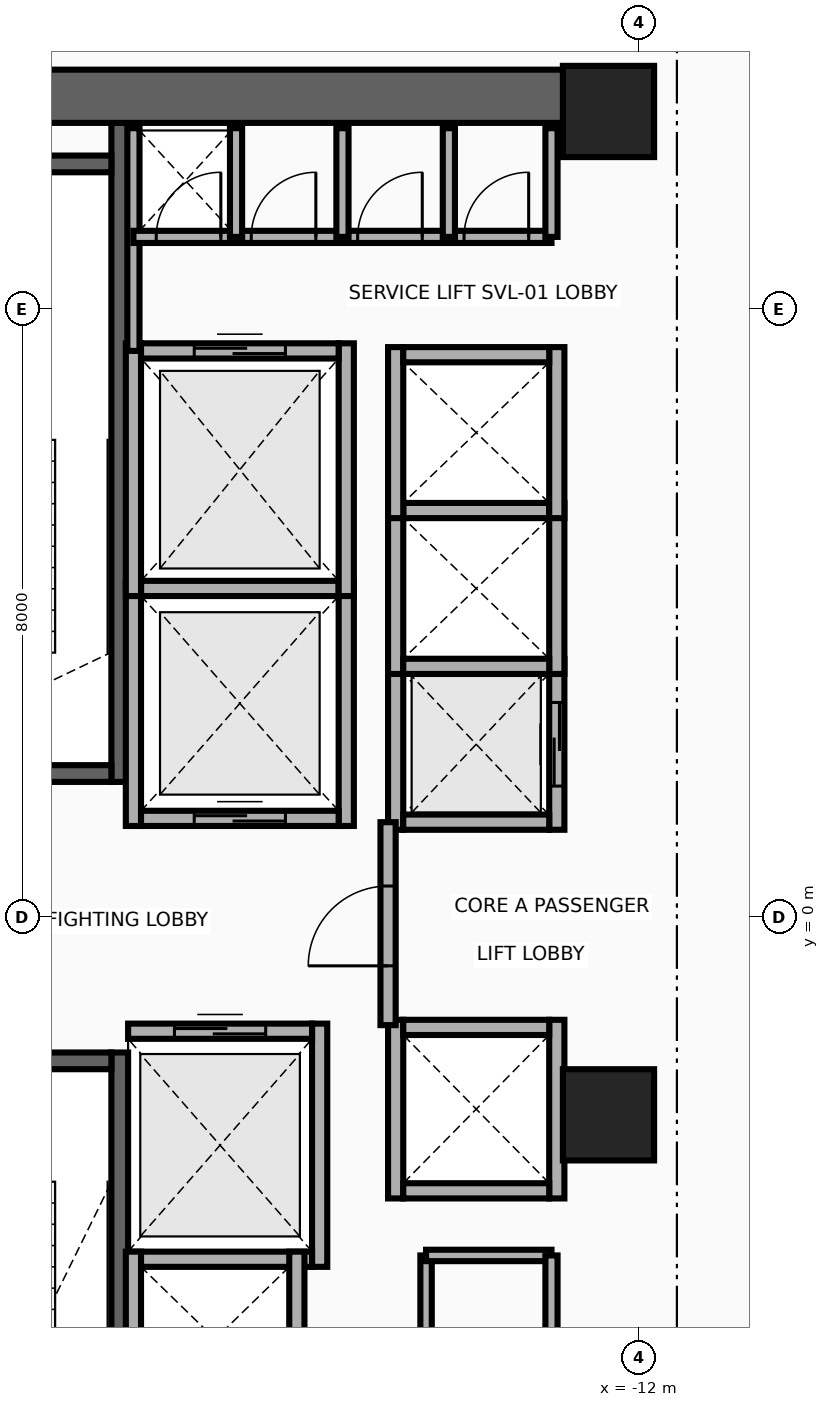
"""IFC4 building model, lengths in metres.
Left out: names, types, materials, properties, quantities, classifications, styles, units other than length and angle.
Written with IfcOpenShell. Run it as: python <this file> out.ifc"""

import sys

from ifc_helpers import new_model, si_unit, direction, frame, frame_2d, origin, origin_2d, place, context, subcontext, project, spatial, rectangle, extrude, source, transform, mapped, element, fill, save


model = new_model("IFC4")
c1 = context("Model", 3, precision=1e-05, world=origin(), true_north=direction((0.0, 1.0)))
c2 = subcontext(c1, "Body", "Model", "MODEL_VIEW")
j1 = project(units=[si_unit("LENGTHUNIT", "METRE"), si_unit("PLANEANGLEUNIT", "RADIAN")], contexts=[c1])
p1 = place(None, origin())
s1 = spatial("IfcSite", under=j1, at=p1, CompositionType="ELEMENT")
p2 = place(p1, origin())
s2 = spatial("IfcBuilding", under=s1, at=p2, CompositionType="ELEMENT")
p3 = place(p2, frame((0.0, 0.0, 139.0)))
s3 = spatial("IfcBuildingStorey", under=s2, at=p3, CompositionType="ELEMENT", Elevation=139.0)
p4 = place(p3, frame((-18.83, 1.78, 0.0), z_axis=(0.0, 0.0, 1.0), x_axis=(0.0, 1.0, 0.0)))
e1 = element("IfcWall", 1, at=p4, inside=s3, PredefinedType="SHEAR", context=c2, shape_type="SweptSolid", body=[
    extrude(rectangle(XDim=8.67, YDim=0.22, at=frame_2d((4.335, 0.0))), origin(), (0.0, 0.0, 1.0), 3.46),
])
p5 = place(p3, frame((-22.05, 1.89, 0.0), z_axis=(0.0, 0.0, 1.0), x_axis=(1.0, 0.0, 0.0)))
e2 = element("IfcWall", 2, at=p5, inside=s3, PredefinedType="SHEAR", context=c2, shape_type="SweptSolid", body=[
    extrude(rectangle(XDim=3.11, YDim=0.22, at=frame_2d((1.555, 0.0))), origin(), (0.0, 0.0, 1.0), 3.46),
])
p6 = place(p5, frame((1.0, 0.0, 0.0)))
e3 = element("IfcOpeningElement", 3, at=p6, cuts=e2, PredefinedType="OPENING", context=c2, shape_type="SweptSolid", body=[
    extrude(rectangle(XDim=1.1, YDim=2.15, at=frame_2d((0.55, 1.075))), frame((0.0, 0.125, 0.0), z_axis=(0.0, -1.0, 0.0), x_axis=(1.0, 0.0, 0.0)), (0.0, 0.0, 1.0), 0.25),
])
p7 = place(p3, frame((-22.05, 9.91, 0.0), z_axis=(0.0, 0.0, 1.0), x_axis=(1.0, 0.0, 0.0)))
e4 = element("IfcWall", 4, at=p7, inside=s3, PredefinedType="SHEAR", context=c2, shape_type="SweptSolid", body=[
    extrude(rectangle(XDim=3.11, YDim=0.22, at=frame_2d((1.555, 0.0))), origin(), (0.0, 0.0, 1.0), 3.46),
])
p8 = place(p3, frame((-18.83, -10.45, 0.0), z_axis=(0.0, 0.0, 1.0), x_axis=(0.0, 1.0, 0.0)))
e5 = element("IfcWall", 5, at=p8, inside=s3, PredefinedType="SHEAR", context=c2, shape_type="SweptSolid", body=[
    extrude(rectangle(XDim=8.67, YDim=0.22, at=frame_2d((4.335, 0.0))), origin(), (0.0, 0.0, 1.0), 3.46),
])
p9 = place(p3, frame((-22.05, -1.89, 0.0), z_axis=(0.0, 0.0, 1.0), x_axis=(1.0, 0.0, 0.0)))
e6 = element("IfcWall", 6, at=p9, inside=s3, PredefinedType="SHEAR", context=c2, shape_type="SweptSolid", body=[
    extrude(rectangle(XDim=3.11, YDim=0.22, at=frame_2d((1.555, 0.0))), origin(), (0.0, 0.0, 1.0), 3.46),
])
p10 = place(p9, frame((1.0, 0.0, 0.0)))
e7 = element("IfcOpeningElement", 7, at=p10, cuts=e6, PredefinedType="OPENING", context=c2, shape_type="SweptSolid", body=[
    extrude(rectangle(XDim=1.1, YDim=2.15, at=frame_2d((0.55, 1.075))), frame((0.0, 0.125, 0.0), z_axis=(0.0, -1.0, 0.0), x_axis=(1.0, 0.0, 0.0)), (0.0, 0.0, 1.0), 0.25),
])
p11 = place(p3, frame((-22.65, 10.8, 0.0), z_axis=(0.0, 0.0, 1.0), x_axis=(1.0, 0.0, 0.0)))
e8 = element("IfcWall", 8, at=p11, inside=s3, PredefinedType="SHEAR", context=c2, shape_type="SweptSolid", body=[
    extrude(rectangle(XDim=10.25, YDim=0.7, at=frame_2d((5.125, 0.0))), origin(), (0.0, 0.0, 1.0), 3.46),
])
m1 = source(origin(), c2, "Body", "SweptSolid", [
    extrude(rectangle(XDim=1.2, YDim=1.2, at=origin_2d()), origin(), (0.0, 0.0, 1.0), 3.7),
])
for number, where, z_axis, x_axis in (
    (9, (-12.4, -2.6, 0.0), (0.0, 0.0, 1.0), (1.0, 0.0, 0.0)),
    (10, (-12.4, 10.6, 0.0), (0.0, 0.0, 1.0), (1.0, 0.0, 0.0)),
):
    element("IfcColumn", number, at=place(p3, frame(where, z_axis=z_axis, x_axis=x_axis)), inside=s3, PredefinedType="COLUMN", context=c2, shape_type="MappedRepresentation", body=[
        mapped(m1, transform((0.0, 0.0, 0.0), x_axis=(1.0, 0.0, 0.0), y_axis=(0.0, 1.0, 0.0), z_axis=(0.0, 0.0, 1.0), scale=1.0)),
    ])
for number, where, z_axis, x_axis in (
    (11, (-18.65, 1.2, 0.0), (0.0, 0.0, 1.0), (0.0, 1.0, 0.0)),
    (12, (-15.85, 1.2, 0.0), (0.0, 0.0, 1.0), (0.0, 1.0, 0.0)),
):
    element("IfcWall", number, at=place(p3, frame(where, z_axis=z_axis, x_axis=x_axis)), inside=s3, PredefinedType="MOVABLE", context=c2, shape_type="SweptSolid", body=[
        extrude(rectangle(XDim=3.225, YDim=0.2, at=frame_2d((1.613, 0.0))), origin(), (0.0, 0.0, 1.0), 3.46),
    ])
p12 = place(p3, frame((-18.55, 1.3, 0.0), z_axis=(0.0, 0.0, 1.0), x_axis=(1.0, 0.0, 0.0)))
e13 = element("IfcWall", 13, at=p12, inside=s3, PredefinedType="MOVABLE", context=c2, shape_type="SweptSolid", body=[
    extrude(rectangle(XDim=2.6, YDim=0.2, at=frame_2d((1.3, 0.0))), origin(), (0.0, 0.0, 1.0), 3.46),
])
p13 = place(p12, frame((0.7, 0.0, 0.0)))
e14 = element("IfcOpeningElement", 14, at=p13, cuts=e13, PredefinedType="OPENING", context=c2, shape_type="SweptSolid", body=[
    extrude(rectangle(XDim=1.2, YDim=2.1, at=frame_2d((0.6, 1.05))), frame((0.0, 0.115, 0.0), z_axis=(0.0, -1.0, 0.0), x_axis=(1.0, 0.0, 0.0)), (0.0, 0.0, 1.0), 0.23),
])
p14 = place(p3, frame((-18.55, 4.325, 0.0), z_axis=(0.0, 0.0, 1.0), x_axis=(1.0, 0.0, 0.0)))
e15 = element("IfcWall", 15, at=p14, inside=s3, PredefinedType="MOVABLE", context=c2, shape_type="SweptSolid", body=[
    extrude(rectangle(XDim=2.6, YDim=0.2, at=frame_2d((1.3, 0.0))), origin(), (0.0, 0.0, 1.0), 3.46),
])
p15 = place(p3, frame((-16.2, -4.6, 0.0), z_axis=(0.0, 0.0, 1.0), x_axis=(0.0, 1.0, 0.0)))
e16 = element("IfcWall", 16, at=p15, inside=s3, PredefinedType="MOVABLE", context=c2, shape_type="SweptSolid", body=[
    extrude(rectangle(XDim=3.2, YDim=0.2, at=frame_2d((1.6, 0.0))), origin(), (0.0, 0.0, 1.0), 3.46),
])
p16 = place(p3, frame((-18.72, -4.5, 0.0), z_axis=(0.0, 0.0, 1.0), x_axis=(1.0, 0.0, 0.0)))
e17 = element("IfcWall", 17, at=p16, inside=s3, PredefinedType="MOVABLE", context=c2, shape_type="SweptSolid", body=[
    extrude(rectangle(XDim=2.42, YDim=0.2, at=frame_2d((1.21, 0.0))), origin(), (0.0, 0.0, 1.0), 3.46),
])
p17 = place(p3, frame((-18.72, -1.5, 0.0), z_axis=(0.0, 0.0, 1.0), x_axis=(1.0, 0.0, 0.0)))
e18 = element("IfcWall", 18, at=p17, inside=s3, PredefinedType="MOVABLE", context=c2, shape_type="SweptSolid", body=[
    extrude(rectangle(XDim=2.42, YDim=0.2, at=frame_2d((1.21, 0.0))), origin(), (0.0, 0.0, 1.0), 3.46),
])
p18 = place(p17, frame((0.61, 0.0, 0.0)))
e19 = element("IfcOpeningElement", 19, at=p18, cuts=e18, PredefinedType="OPENING", context=c2, shape_type="SweptSolid", body=[
    extrude(rectangle(XDim=1.2, YDim=2.1, at=frame_2d((0.6, 1.05))), frame((0.0, 0.115, 0.0), z_axis=(0.0, -1.0, 0.0), x_axis=(1.0, 0.0, 0.0)), (0.0, 0.0, 1.0), 0.23),
])
for number, where, z_axis, x_axis in (
    (20, (-18.65, 4.225, 0.0), (0.0, 0.0, 1.0), (0.0, 1.0, 0.0)),
    (21, (-15.85, 4.225, 0.0), (0.0, 0.0, 1.0), (0.0, 1.0, 0.0)),
):
    element("IfcWall", number, at=place(p3, frame(where, z_axis=z_axis, x_axis=x_axis)), inside=s3, PredefinedType="MOVABLE", context=c2, shape_type="SweptSolid", body=[
        extrude(rectangle(XDim=3.325, YDim=0.2, at=frame_2d((1.663, 0.0))), origin(), (0.0, 0.0, 1.0), 3.46),
    ])
p19 = place(p3, frame((-18.55, 7.45, 0.0), z_axis=(0.0, 0.0, 1.0), x_axis=(1.0, 0.0, 0.0)))
e22 = element("IfcWall", 22, at=p19, inside=s3, PredefinedType="MOVABLE", context=c2, shape_type="SweptSolid", body=[
    extrude(rectangle(XDim=2.6, YDim=0.2, at=frame_2d((1.3, 0.0))), origin(), (0.0, 0.0, 1.0), 3.46),
])
p20 = place(p19, frame((0.7, 0.0, 0.0)))
e23 = element("IfcOpeningElement", 23, at=p20, cuts=e22, PredefinedType="OPENING", context=c2, shape_type="SweptSolid", body=[
    extrude(rectangle(XDim=1.2, YDim=2.1, at=frame_2d((0.6, 1.05))), frame((0.0, 0.115, 0.0), z_axis=(0.0, -1.0, 0.0), x_axis=(1.0, 0.0, 0.0)), (0.0, 0.0, 1.0), 0.23),
])
p21 = place(p3, frame((-15.2, 1.15, 0.0), z_axis=(0.0, 0.0, 1.0), x_axis=(0.0, 1.0, 0.0)))
e24 = element("IfcWall", 24, at=p21, inside=s3, PredefinedType="MOVABLE", context=c2, shape_type="SweptSolid", body=[
    extrude(rectangle(XDim=2.25, YDim=0.2, at=frame_2d((1.125, 0.0))), origin(), (0.0, 0.0, 1.0), 3.46),
])
p22 = place(p3, frame((-13.08, 1.15, 0.0), z_axis=(0.0, 0.0, 1.0), x_axis=(0.0, 1.0, 0.0)))
e25 = element("IfcWall", 25, at=p22, inside=s3, PredefinedType="MOVABLE", context=c2, shape_type="SweptSolid", body=[
    extrude(rectangle(XDim=2.25, YDim=0.2, at=frame_2d((1.125, 0.0))), origin(), (0.0, 0.0, 1.0), 3.46),
])
p23 = place(p22, frame((0.575, 0.0, 0.0)))
e26 = element("IfcOpeningElement", 26, at=p23, cuts=e25, PredefinedType="OPENING", context=c2, shape_type="SweptSolid", body=[
    extrude(rectangle(XDim=1.1, YDim=2.1, at=frame_2d((0.55, 1.05))), frame((0.0, 0.115, 0.0), z_axis=(0.0, -1.0, 0.0), x_axis=(1.0, 0.0, 0.0)), (0.0, 0.0, 1.0), 0.23),
])
p24 = place(p3, frame((-15.1, 1.25, 0.0), z_axis=(0.0, 0.0, 1.0), x_axis=(1.0, 0.0, 0.0)))
e27 = element("IfcWall", 27, at=p24, inside=s3, PredefinedType="MOVABLE", context=c2, shape_type="SweptSolid", body=[
    extrude(rectangle(XDim=1.92, YDim=0.2, at=frame_2d((0.96, 0.0))), origin(), (0.0, 0.0, 1.0), 3.46),
])
for number, where, z_axis, x_axis in (
    (28, (-15.2, 3.2, 0.0), (0.0, 0.0, 1.0), (0.0, 1.0, 0.0)),
    (29, (-13.08, 3.2, 0.0), (0.0, 0.0, 1.0), (0.0, 1.0, 0.0)),
):
    element("IfcWall", number, at=place(p3, frame(where, z_axis=z_axis, x_axis=x_axis)), inside=s3, PredefinedType="MOVABLE", context=c2, shape_type="SweptSolid", body=[
        extrude(rectangle(XDim=2.25, YDim=0.2, at=frame_2d((1.125, 0.0))), origin(), (0.0, 0.0, 1.0), 3.46),
    ])
for number, where, z_axis, x_axis in (
    (30, (-15.1, 3.3, 0.0), (0.0, 0.0, 1.0), (1.0, 0.0, 0.0)),
    (31, (-15.1, 5.35, 0.0), (0.0, 0.0, 1.0), (1.0, 0.0, 0.0)),
):
    element("IfcWall", number, at=place(p3, frame(where, z_axis=z_axis, x_axis=x_axis)), inside=s3, PredefinedType="MOVABLE", context=c2, shape_type="SweptSolid", body=[
        extrude(rectangle(XDim=1.92, YDim=0.2, at=frame_2d((0.96, 0.0))), origin(), (0.0, 0.0, 1.0), 3.46),
    ])
for number, where, z_axis, x_axis in (
    (32, (-15.2, 5.25, 0.0), (0.0, 0.0, 1.0), (0.0, 1.0, 0.0)),
    (33, (-13.08, 5.25, 0.0), (0.0, 0.0, 1.0), (0.0, 1.0, 0.0)),
):
    element("IfcWall", number, at=place(p3, frame(where, z_axis=z_axis, x_axis=x_axis)), inside=s3, PredefinedType="MOVABLE", context=c2, shape_type="SweptSolid", body=[
        extrude(rectangle(XDim=2.25, YDim=0.2, at=frame_2d((1.125, 0.0))), origin(), (0.0, 0.0, 1.0), 3.46),
    ])
p25 = place(p3, frame((-15.1, 7.4, 0.0), z_axis=(0.0, 0.0, 1.0), x_axis=(1.0, 0.0, 0.0)))
e34 = element("IfcWall", 34, at=p25, inside=s3, PredefinedType="MOVABLE", context=c2, shape_type="SweptSolid", body=[
    extrude(rectangle(XDim=1.92, YDim=0.2, at=frame_2d((0.96, 0.0))), origin(), (0.0, 0.0, 1.0), 3.46),
])
for number, where, z_axis, x_axis in (
    (35, (-18.65, -6.7, 0.0), (0.0, 0.0, 1.0), (0.0, 1.0, 0.0)),
    (36, (-16.5, -6.7, 0.0), (0.0, 0.0, 1.0), (0.0, 1.0, 0.0)),
):
    element("IfcWall", number, at=place(p3, frame(where, z_axis=z_axis, x_axis=x_axis)), inside=s3, PredefinedType="MOVABLE", context=c2, shape_type="SweptSolid", body=[
        extrude(rectangle(XDim=2.3, YDim=0.2, at=frame_2d((1.15, 0.0))), origin(), (0.0, 0.0, 1.0), 3.46),
    ])
for number, where, z_axis, x_axis in (
    (37, (-15.2, -3.7, 0.0), (0.0, 0.0, 1.0), (0.0, 1.0, 0.0)),
    (38, (-13.08, -3.7, 0.0), (0.0, 0.0, 1.0), (0.0, 1.0, 0.0)),
):
    element("IfcWall", number, at=place(p3, frame(where, z_axis=z_axis, x_axis=x_axis)), inside=s3, PredefinedType="MOVABLE", context=c2, shape_type="SweptSolid", body=[
        extrude(rectangle(XDim=2.35, YDim=0.2, at=frame_2d((1.175, 0.0))), origin(), (0.0, 0.0, 1.0), 3.46),
    ])
for number, where, z_axis, x_axis in (
    (39, (-15.1, -3.6, 0.0), (0.0, 0.0, 1.0), (1.0, 0.0, 0.0)),
    (40, (-15.1, -1.45, 0.0), (0.0, 0.0, 1.0), (1.0, 0.0, 0.0)),
):
    element("IfcWall", number, at=place(p3, frame(where, z_axis=z_axis, x_axis=x_axis)), inside=s3, PredefinedType="MOVABLE", context=c2, shape_type="SweptSolid", body=[
        extrude(rectangle(XDim=1.92, YDim=0.2, at=frame_2d((0.96, 0.0))), origin(), (0.0, 0.0, 1.0), 3.46),
    ])
p26 = place(p3, frame((-15.3, -1.42, 0.0), z_axis=(0.0, 0.0, 1.0), x_axis=(0.0, 1.0, 0.0)))
e41 = element("IfcWall", 41, at=p26, inside=s3, PredefinedType="PARTITIONING", context=c2, shape_type="SweptSolid", body=[
    extrude(rectangle(XDim=2.67, YDim=0.2, at=frame_2d((1.335, 0.0))), origin(), (0.0, 0.0, 1.0), 3.46),
])
p27 = place(p26, frame((0.78, 0.0, 0.0)))
e42 = element("IfcOpeningElement", 42, at=p27, cuts=e41, PredefinedType="OPENING", context=c2, shape_type="SweptSolid", body=[
    extrude(rectangle(XDim=1.05, YDim=2.15, at=frame_2d((0.525, 1.075))), frame((0.0, 0.115, 0.0), z_axis=(0.0, -1.0, 0.0), x_axis=(1.0, 0.0, 0.0)), (0.0, 0.0, 1.0), 0.23),
])
p28 = place(p3, frame((-18.65, 7.45, 0.0), z_axis=(0.0, 0.0, 1.0), x_axis=(0.0, 1.0, 0.0)))
e43 = element("IfcWall", 43, at=p28, inside=s3, PredefinedType="PARTITIONING", context=c2, shape_type="SweptSolid", body=[
    extrude(rectangle(XDim=2.93, YDim=0.16, at=frame_2d((1.465, 0.0))), origin(), (0.0, 0.0, 1.0), 3.46),
])
p29 = place(p3, frame((-18.65, 8.95, 0.0), z_axis=(0.0, 0.0, 1.0), x_axis=(1.0, 0.0, 0.0)))
e44 = element("IfcWall", 44, at=p29, inside=s3, PredefinedType="PARTITIONING", context=c2, shape_type="SweptSolid", body=[
    extrude(rectangle(XDim=5.5, YDim=0.16, at=frame_2d((2.75, 0.0))), origin(), (0.0, 0.0, 1.0), 3.46),
])
p30 = place(p29, frame((0.3, 0.0, 0.0)))
e45 = element("IfcOpeningElement", 45, at=p30, cuts=e44, PredefinedType="OPENING", context=c2, shape_type="SweptSolid", body=[
    extrude(rectangle(XDim=0.85, YDim=2.05, at=frame_2d((0.425, 1.025))), frame((0.0, 0.095, 0.0), z_axis=(0.0, -1.0, 0.0), x_axis=(1.0, 0.0, 0.0)), (0.0, 0.0, 1.0), 0.19),
])
p31 = place(p29, frame((1.55, 0.0, 0.0)))
e46 = element("IfcOpeningElement", 46, at=p31, cuts=e44, PredefinedType="OPENING", context=c2, shape_type="SweptSolid", body=[
    extrude(rectangle(XDim=0.85, YDim=2.05, at=frame_2d((0.425, 1.025))), frame((0.0, 0.095, 0.0), z_axis=(0.0, -1.0, 0.0), x_axis=(1.0, 0.0, 0.0)), (0.0, 0.0, 1.0), 0.19),
])
p32 = place(p29, frame((2.95, 0.0, 0.0)))
e47 = element("IfcOpeningElement", 47, at=p32, cuts=e44, PredefinedType="OPENING", context=c2, shape_type="SweptSolid", body=[
    extrude(rectangle(XDim=0.85, YDim=2.05, at=frame_2d((0.425, 1.025))), frame((0.0, 0.095, 0.0), z_axis=(0.0, -1.0, 0.0), x_axis=(1.0, 0.0, 0.0)), (0.0, 0.0, 1.0), 0.19),
])
p33 = place(p29, frame((4.35, 0.0, 0.0)))
e48 = element("IfcOpeningElement", 48, at=p33, cuts=e44, PredefinedType="OPENING", context=c2, shape_type="SweptSolid", body=[
    extrude(rectangle(XDim=0.85, YDim=2.05, at=frame_2d((0.425, 1.025))), frame((0.0, 0.095, 0.0), z_axis=(0.0, -1.0, 0.0), x_axis=(1.0, 0.0, 0.0)), (0.0, 0.0, 1.0), 0.19),
])
for number, where, z_axis, x_axis in (
    (49, (-13.15, 8.95, 0.0), (0.0, 0.0, 1.0), (0.0, 1.0, 0.0)),
    (50, (-17.3, 8.95, 0.0), (0.0, 0.0, 1.0), (0.0, 1.0, 0.0)),
    (51, (-15.9, 8.95, 0.0), (0.0, 0.0, 1.0), (0.0, 1.0, 0.0)),
    (52, (-14.5, 8.95, 0.0), (0.0, 0.0, 1.0), (0.0, 1.0, 0.0)),
):
    element("IfcWall", number, at=place(p3, frame(where, z_axis=z_axis, x_axis=x_axis)), inside=s3, PredefinedType="PARTITIONING", context=c2, shape_type="SweptSolid", body=[
        extrude(rectangle(XDim=1.43, YDim=0.16, at=frame_2d((0.715, 0.0))), origin(), (0.0, 0.0, 1.0), 3.46),
    ])
p34 = place(p3, frame((-14.8, -6.58, 0.0), z_axis=(0.0, 0.0, 1.0), x_axis=(0.0, 1.0, 0.0)))
e53 = element("IfcWall", 53, at=p34, inside=s3, PredefinedType="PARTITIONING", context=c2, shape_type="SweptSolid", body=[
    extrude(rectangle(XDim=2.13, YDim=0.15, at=frame_2d((1.065, 0.0))), origin(), (0.0, 0.0, 1.0), 3.46),
])
p35 = place(p3, frame((-14.8, -4.45, 0.0), z_axis=(0.0, 0.0, 1.0), x_axis=(1.0, 0.0, 0.0)))
e54 = element("IfcWall", 54, at=p35, inside=s3, PredefinedType="PARTITIONING", context=c2, shape_type="SweptSolid", body=[
    extrude(rectangle(XDim=1.65, YDim=0.15, at=frame_2d((0.825, 0.0))), origin(), (0.0, 0.0, 1.0), 3.46),
])
p36 = place(p3, frame((-13.15, -6.58, 0.0), z_axis=(0.0, 0.0, 1.0), x_axis=(0.0, 1.0, 0.0)))
e55 = element("IfcWall", 55, at=p36, inside=s3, PredefinedType="PARTITIONING", context=c2, shape_type="SweptSolid", body=[
    extrude(rectangle(XDim=2.13, YDim=0.16, at=frame_2d((1.065, 0.0))), origin(), (0.0, 0.0, 1.0), 3.46),
])
p37 = place(p13, origin())
e56 = element("IfcDoor", 56, at=p37, inside=s3, OperationType="DOUBLE_DOOR_SLIDING", PredefinedType="DOOR", context=c2, shape_type="SweptSolid", body=[
    extrude(rectangle(XDim=1.2, YDim=2.1, at=frame_2d((0.6, 1.05))), frame((0.0, 0.025, 0.0), z_axis=(0.0, -1.0, 0.0), x_axis=(1.0, 0.0, 0.0)), (0.0, 0.0, 1.0), 0.05),
])
fill(e14, e56)
p38 = place(p18, origin())
e57 = element("IfcDoor", 57, at=p38, inside=s3, OperationType="DOUBLE_DOOR_SLIDING", PredefinedType="DOOR", context=c2, shape_type="SweptSolid", body=[
    extrude(rectangle(XDim=1.2, YDim=2.1, at=frame_2d((0.6, 1.05))), frame((0.0, 0.025, 0.0), z_axis=(0.0, -1.0, 0.0), x_axis=(1.0, 0.0, 0.0)), (0.0, 0.0, 1.0), 0.05),
])
fill(e19, e57)
p39 = place(p20, origin())
e58 = element("IfcDoor", 58, at=p39, inside=s3, OperationType="DOUBLE_DOOR_SLIDING", PredefinedType="DOOR", context=c2, shape_type="SweptSolid", body=[
    extrude(rectangle(XDim=1.2, YDim=2.1, at=frame_2d((0.6, 1.05))), frame((0.0, 0.025, 0.0), z_axis=(0.0, -1.0, 0.0), x_axis=(1.0, 0.0, 0.0)), (0.0, 0.0, 1.0), 0.05),
])
fill(e23, e58)
p40 = place(p23, origin())
e59 = element("IfcDoor", 59, at=p40, inside=s3, OperationType="DOUBLE_DOOR_SLIDING", PredefinedType="DOOR", context=c2, shape_type="SweptSolid", body=[
    extrude(rectangle(XDim=1.1, YDim=2.1, at=frame_2d((0.55, 1.05))), frame((0.0, 0.025, 0.0), z_axis=(0.0, -1.0, 0.0), x_axis=(1.0, 0.0, 0.0)), (0.0, 0.0, 1.0), 0.05),
])
fill(e26, e59)
p41 = place(p27, origin())
e60 = element("IfcDoor", 60, at=p41, inside=s3, OperationType="SINGLE_SWING_RIGHT", PredefinedType="DOOR", context=c2, shape_type="SweptSolid", body=[
    extrude(rectangle(XDim=1.05, YDim=2.15, at=frame_2d((0.525, 1.075))), frame((0.0, 0.025, 0.0), z_axis=(0.0, -1.0, 0.0), x_axis=(1.0, 0.0, 0.0)), (0.0, 0.0, 1.0), 0.05),
])
fill(e42, e60)
p42 = place(p30, origin())
e61 = element("IfcDoor", 61, at=p42, inside=s3, OperationType="SINGLE_SWING_LEFT", PredefinedType="DOOR", context=c2, shape_type="SweptSolid", body=[
    extrude(rectangle(XDim=0.85, YDim=2.05, at=frame_2d((0.425, 1.025))), frame((0.0, 0.025, 0.0), z_axis=(0.0, -1.0, 0.0), x_axis=(1.0, 0.0, 0.0)), (0.0, 0.0, 1.0), 0.05),
])
fill(e45, e61)
p43 = place(p31, origin())
e62 = element("IfcDoor", 62, at=p43, inside=s3, OperationType="SINGLE_SWING_RIGHT", PredefinedType="DOOR", context=c2, shape_type="SweptSolid", body=[
    extrude(rectangle(XDim=0.85, YDim=2.05, at=frame_2d((0.425, 1.025))), frame((0.0, 0.025, 0.0), z_axis=(0.0, -1.0, 0.0), x_axis=(1.0, 0.0, 0.0)), (0.0, 0.0, 1.0), 0.05),
])
fill(e46, e62)
p44 = place(p32, origin())
e63 = element("IfcDoor", 63, at=p44, inside=s3, OperationType="SINGLE_SWING_LEFT", PredefinedType="DOOR", context=c2, shape_type="SweptSolid", body=[
    extrude(rectangle(XDim=0.85, YDim=2.05, at=frame_2d((0.425, 1.025))), frame((0.0, 0.025, 0.0), z_axis=(0.0, -1.0, 0.0), x_axis=(1.0, 0.0, 0.0)), (0.0, 0.0, 1.0), 0.05),
])
fill(e47, e63)
p45 = place(p33, origin())
e64 = element("IfcDoor", 64, at=p45, inside=s3, OperationType="SINGLE_SWING_RIGHT", PredefinedType="DOOR", context=c2, shape_type="SweptSolid", body=[
    extrude(rectangle(XDim=0.85, YDim=2.05, at=frame_2d((0.425, 1.025))), frame((0.0, 0.025, 0.0), z_axis=(0.0, -1.0, 0.0), x_axis=(1.0, 0.0, 0.0)), (0.0, 0.0, 1.0), 0.05),
])
fill(e48, e64)
save(model, sys.argv[1])
